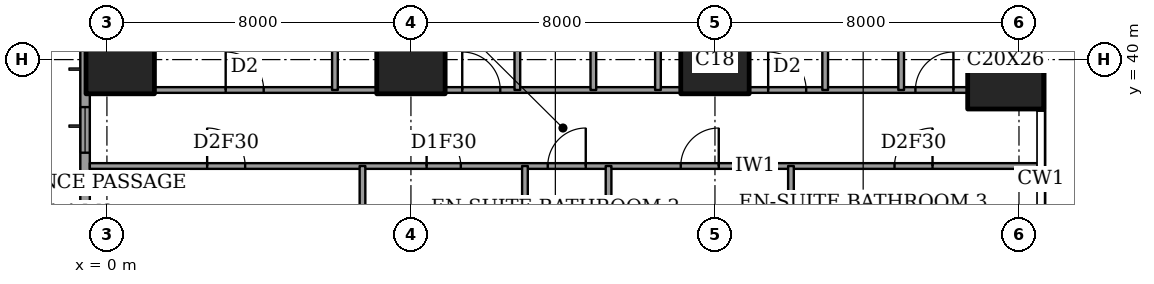
"""IFC4 building model, lengths in metres.
Left out: names, types, materials, properties, quantities, classifications, styles, units other than length and angle.
Written with IfcOpenShell. Run it as: python <this file> out.ifc"""

import sys

from ifc_helpers import new_model, si_unit, direction, frame, frame_2d, origin, origin_2d, place, context, subcontext, project, spatial, rectangle, extrude, element, fill, save


model = new_model("IFC4")
c1 = context("Model", 3, precision=1e-05, world=origin(), true_north=direction((0.0, 1.0)))
c2 = subcontext(c1, "Body", "Model", "MODEL_VIEW")
j1 = project(units=[si_unit("LENGTHUNIT", "METRE"), si_unit("PLANEANGLEUNIT", "RADIAN")], contexts=[c1])
p1 = place(None, origin())
s1 = spatial("IfcSite", under=j1, at=p1, CompositionType="ELEMENT")
p2 = place(p1, origin())
s2 = spatial("IfcBuilding", under=s1, at=p2, CompositionType="ELEMENT")
p3 = place(p2, frame((0.0, 0.0, 203.8)))
s3 = spatial("IfcBuildingStorey", under=s2, at=p3, CompositionType="ELEMENT", Elevation=203.8)
for number, where, z_axis, x_axis in (
    (1, (0.35, 40.0, 0.0), (0.0, 0.0, 1.0), (1.0, 0.0, 0.0)),
    (2, (8.0, 40.0, 0.0), (0.0, 0.0, 1.0), (1.0, 0.0, 0.0)),
    (3, (16.0, 40.0, 0.0), (0.0, 0.0, 1.0), (1.0, 0.0, 0.0)),
):
    element("IfcColumn", number, at=place(p3, frame(where, z_axis=z_axis, x_axis=x_axis)), inside=s3, PredefinedType="COLUMN", context=c2, shape_type="SweptSolid", body=[
        extrude(rectangle(XDim=1.8, YDim=1.8, at=origin_2d()), origin(), (0.0, 0.0, 1.0), 3.6),
    ])
p4 = place(p3, frame((23.65, 40.0, 0.0), z_axis=(0.0, 0.0, 1.0), x_axis=(1.0, 0.0, 0.0)))
e4 = element("IfcColumn", 4, at=p4, inside=s3, PredefinedType="COLUMN", context=c2, shape_type="SweptSolid", body=[
    extrude(rectangle(XDim=2.0, YDim=2.6, at=origin_2d()), origin(), (0.0, 0.0, 1.0), 3.6),
])
p5 = place(p3, frame((-0.575, 44.825, 0.0), z_axis=(0.0, 0.0, 1.0), x_axis=(0.0, -1.0, 0.0)))
e5 = element("IfcWall", 5, at=p5, inside=s3, PredefinedType="SOLIDWALL", context=c2, shape_type="SweptSolid", body=[
    extrude(rectangle(XDim=41.65, YDim=0.25, at=frame_2d((20.825, 0.0))), origin(), (0.0, 0.0, 1.0), 3.6),
])
p6 = place(p5, frame((0.825, 0.0, 0.2)))
e6 = element("IfcOpeningElement", 6, at=p6, cuts=e5, PredefinedType="OPENING", context=c2, shape_type="SweptSolid", body=[
    extrude(rectangle(XDim=2.4, YDim=2.4, at=frame_2d((1.2, 1.2))), frame((0.0, 0.135, 0.0), z_axis=(0.0, -1.0, 0.0), x_axis=(1.0, 0.0, 0.0)), (0.0, 0.0, 1.0), 0.27),
])
p7 = place(p5, frame((6.075, 0.0, 0.2)))
e7 = element("IfcOpeningElement", 7, at=p7, cuts=e5, PredefinedType="OPENING", context=c2, shape_type="SweptSolid", body=[
    extrude(rectangle(XDim=1.2, YDim=2.4, at=frame_2d((0.6, 1.2))), frame((0.0, 0.135, 0.0), z_axis=(0.0, -1.0, 0.0), x_axis=(1.0, 0.0, 0.0)), (0.0, 0.0, 1.0), 0.27),
])
p8 = place(p5, frame((8.575, 0.0, 0.2)))
e8 = element("IfcOpeningElement", 8, at=p8, cuts=e5, PredefinedType="OPENING", context=c2, shape_type="SweptSolid", body=[
    extrude(rectangle(XDim=2.4, YDim=2.4, at=frame_2d((1.2, 1.2))), frame((0.0, 0.135, 0.0), z_axis=(0.0, -1.0, 0.0), x_axis=(1.0, 0.0, 0.0)), (0.0, 0.0, 1.0), 0.27),
])
p9 = place(p5, frame((15.675, 0.0, 0.2)))
e9 = element("IfcOpeningElement", 9, at=p9, cuts=e5, PredefinedType="OPENING", context=c2, shape_type="SweptSolid", body=[
    extrude(rectangle(XDim=2.4, YDim=2.4, at=frame_2d((1.2, 1.2))), frame((0.0, 0.135, 0.0), z_axis=(0.0, -1.0, 0.0), x_axis=(1.0, 0.0, 0.0)), (0.0, 0.0, 1.0), 0.27),
])
p10 = place(p5, frame((23.575, 0.0, 0.2)))
e10 = element("IfcOpeningElement", 10, at=p10, cuts=e5, PredefinedType="OPENING", context=c2, shape_type="SweptSolid", body=[
    extrude(rectangle(XDim=2.4, YDim=2.4, at=frame_2d((1.2, 1.2))), frame((0.0, 0.135, 0.0), z_axis=(0.0, -1.0, 0.0), x_axis=(1.0, 0.0, 0.0)), (0.0, 0.0, 1.0), 0.27),
])
p11 = place(p5, frame((30.775, 0.0, 0.2)))
e11 = element("IfcOpeningElement", 11, at=p11, cuts=e5, PredefinedType="OPENING", context=c2, shape_type="SweptSolid", body=[
    extrude(rectangle(XDim=2.4, YDim=2.4, at=frame_2d((1.2, 1.2))), frame((0.0, 0.135, 0.0), z_axis=(0.0, -1.0, 0.0), x_axis=(1.0, 0.0, 0.0)), (0.0, 0.0, 1.0), 0.27),
])
p12 = place(p5, frame((34.55, 0.0, 0.2)))
e12 = element("IfcOpeningElement", 12, at=p12, cuts=e5, PredefinedType="OPENING", context=c2, shape_type="SweptSolid", body=[
    extrude(rectangle(XDim=1.2, YDim=2.4, at=frame_2d((0.6, 1.2))), frame((0.0, 0.135, 0.0), z_axis=(0.0, -1.0, 0.0), x_axis=(1.0, 0.0, 0.0)), (0.0, 0.0, 1.0), 0.27),
])
p13 = place(p5, frame((38.425, 0.0, 0.2)))
e13 = element("IfcOpeningElement", 13, at=p13, cuts=e5, PredefinedType="OPENING", context=c2, shape_type="SweptSolid", body=[
    extrude(rectangle(XDim=2.4, YDim=2.4, at=frame_2d((1.2, 1.2))), frame((0.0, 0.135, 0.0), z_axis=(0.0, -1.0, 0.0), x_axis=(1.0, 0.0, 0.0)), (0.0, 0.0, 1.0), 0.27),
])
p14 = place(p3, frame((-0.45, 37.2, 0.0), z_axis=(0.0, 0.0, 1.0), x_axis=(1.0, 0.0, 0.0)))
e14 = element("IfcWall", 14, at=p14, inside=s3, PredefinedType="PARTITIONING", context=c2, shape_type="SweptSolid", body=[
    extrude(rectangle(XDim=25.011, YDim=0.15, at=frame_2d((12.505, 0.0))), origin(), (0.0, 0.0, 1.0), 3.35),
])
p15 = place(p14, frame((12.05, 0.0, 0.0)))
e15 = element("IfcOpeningElement", 15, at=p15, cuts=e14, PredefinedType="OPENING", context=c2, shape_type="SweptSolid", body=[
    extrude(rectangle(XDim=1.0, YDim=2.1, at=frame_2d((0.5, 1.05))), frame((0.0, 0.085, 0.0), z_axis=(0.0, -1.0, 0.0), x_axis=(1.0, 0.0, 0.0)), (0.0, 0.0, 1.0), 0.17),
])
p16 = place(p14, frame((3.087, 0.0, 0.0)))
e16 = element("IfcOpeningElement", 16, at=p16, cuts=e14, PredefinedType="OPENING", context=c2, shape_type="SweptSolid", body=[
    extrude(rectangle(XDim=1.0, YDim=2.1, at=frame_2d((0.5, 1.05))), frame((0.0, 0.085, 0.0), z_axis=(0.0, -1.0, 0.0), x_axis=(1.0, 0.0, 0.0)), (0.0, 0.0, 1.0), 0.17),
])
p17 = place(p14, frame((8.863, 0.0, 0.0)))
e17 = element("IfcOpeningElement", 17, at=p17, cuts=e14, PredefinedType="OPENING", context=c2, shape_type="SweptSolid", body=[
    extrude(rectangle(XDim=0.9, YDim=2.1, at=frame_2d((0.45, 1.05))), frame((0.0, 0.085, 0.0), z_axis=(0.0, -1.0, 0.0), x_axis=(1.0, 0.0, 0.0)), (0.0, 0.0, 1.0), 0.17),
])
p18 = place(p14, frame((15.55, 0.0, 0.0)))
e18 = element("IfcOpeningElement", 18, at=p18, cuts=e14, PredefinedType="OPENING", context=c2, shape_type="SweptSolid", body=[
    extrude(rectangle(XDim=1.0, YDim=2.1, at=frame_2d((0.5, 1.05))), frame((0.0, 0.085, 0.0), z_axis=(0.0, -1.0, 0.0), x_axis=(1.0, 0.0, 0.0)), (0.0, 0.0, 1.0), 0.17),
])
p19 = place(p14, frame((21.175, 0.0, 0.0)))
e19 = element("IfcOpeningElement", 19, at=p19, cuts=e14, PredefinedType="OPENING", context=c2, shape_type="SweptSolid", body=[
    extrude(rectangle(XDim=1.0, YDim=2.1, at=frame_2d((0.5, 1.05))), frame((0.0, 0.085, 0.0), z_axis=(0.0, -1.0, 0.0), x_axis=(1.0, 0.0, 0.0)), (0.0, 0.0, 1.0), 0.17),
])
p20 = place(p3, frame((1.25, 39.2, 0.0), z_axis=(0.0, 0.0, 1.0), x_axis=(1.0, 0.0, 0.0)))
e20 = element("IfcWall", 20, at=p20, inside=s3, PredefinedType="PARTITIONING", context=c2, shape_type="SweptSolid", body=[
    extrude(rectangle(XDim=5.85, YDim=0.15, at=frame_2d((2.925, 0.0))), origin(), (0.0, 0.0, 1.0), 3.35),
])
p21 = place(p20, frame((1.875, 0.0, 0.0)))
e21 = element("IfcOpeningElement", 21, at=p21, cuts=e20, PredefinedType="OPENING", context=c2, shape_type="SweptSolid", body=[
    extrude(rectangle(XDim=1.0, YDim=2.1, at=frame_2d((0.5, 1.05))), frame((0.0, 0.085, 0.0), z_axis=(0.0, -1.0, 0.0), x_axis=(1.0, 0.0, 0.0)), (0.0, 0.0, 1.0), 0.17),
])
p22 = place(p3, frame((8.9, 39.2, 0.0), z_axis=(0.0, 0.0, 1.0), x_axis=(1.0, 0.0, 0.0)))
e22 = element("IfcWall", 22, at=p22, inside=s3, PredefinedType="PARTITIONING", context=c2, shape_type="SweptSolid", body=[
    extrude(rectangle(XDim=6.2, YDim=0.15, at=frame_2d((3.1, 0.0))), origin(), (0.0, 0.0, 1.0), 3.35),
])
p23 = place(p22, frame((0.45, 0.0, 0.0)))
e23 = element("IfcOpeningElement", 23, at=p23, cuts=e22, PredefinedType="OPENING", context=c2, shape_type="SweptSolid", body=[
    extrude(rectangle(XDim=1.0, YDim=2.1, at=frame_2d((0.5, 1.05))), frame((0.0, 0.085, 0.0), z_axis=(0.0, -1.0, 0.0), x_axis=(1.0, 0.0, 0.0)), (0.0, 0.0, 1.0), 0.17),
])
p24 = place(p3, frame((16.9, 39.2, 0.0), z_axis=(0.0, 0.0, 1.0), x_axis=(1.0, 0.0, 0.0)))
e24 = element("IfcWall", 24, at=p24, inside=s3, PredefinedType="PARTITIONING", context=c2, shape_type="SweptSolid", body=[
    extrude(rectangle(XDim=5.75, YDim=0.15, at=frame_2d((2.875, 0.0))), origin(), (0.0, 0.0, 1.0), 3.35),
])
p25 = place(p24, frame((0.5, 0.0, 0.0)))
e25 = element("IfcOpeningElement", 25, at=p25, cuts=e24, PredefinedType="OPENING", context=c2, shape_type="SweptSolid", body=[
    extrude(rectangle(XDim=1.0, YDim=2.1, at=frame_2d((0.5, 1.05))), frame((0.0, 0.085, 0.0), z_axis=(0.0, -1.0, 0.0), x_axis=(1.0, 0.0, 0.0)), (0.0, 0.0, 1.0), 0.17),
])
p26 = place(p24, frame((4.375, 0.0, 0.0)))
e26 = element("IfcOpeningElement", 26, at=p26, cuts=e24, PredefinedType="OPENING", context=c2, shape_type="SweptSolid", body=[
    extrude(rectangle(XDim=1.0, YDim=2.1, at=frame_2d((0.5, 1.05))), frame((0.0, 0.085, 0.0), z_axis=(0.0, -1.0, 0.0), x_axis=(1.0, 0.0, 0.0)), (0.0, 0.0, 1.0), 0.17),
])
p27 = place(p3, frame((6.0, 39.2, 0.0), z_axis=(0.0, 0.0, 1.0), x_axis=(0.0, 1.0, 0.0)))
e27 = element("IfcWall", 27, at=p27, inside=s3, PredefinedType="PARTITIONING", context=c2, shape_type="SweptSolid", body=[
    extrude(rectangle(XDim=9.25, YDim=0.15, at=frame_2d((4.625, 0.0))), origin(), (0.0, 0.0, 1.0), 3.35),
])
p28 = place(p3, frame((6.725, 33.2, 0.0), z_axis=(0.0, 0.0, 1.0), x_axis=(0.0, 1.0, 0.0)))
e28 = element("IfcWall", 28, at=p28, inside=s3, PredefinedType="PARTITIONING", context=c2, shape_type="SweptSolid", body=[
    extrude(rectangle(XDim=4.0, YDim=0.15, at=frame_2d((2.0, 0.0))), origin(), (0.0, 0.0, 1.0), 3.35),
])
p29 = place(p3, frame((10.8, 39.2, 0.0), z_axis=(0.0, 0.0, 1.0), x_axis=(0.0, 1.0, 0.0)))
e29 = element("IfcWall", 29, at=p29, inside=s3, PredefinedType="PARTITIONING", context=c2, shape_type="SweptSolid", body=[
    extrude(rectangle(XDim=3.4, YDim=0.15, at=frame_2d((1.7, 0.0))), origin(), (0.0, 0.0, 1.0), 3.35),
])
p30 = place(p29, frame((1.25, 0.0, 0.0)))
e30 = element("IfcOpeningElement", 30, at=p30, cuts=e29, PredefinedType="OPENING", context=c2, shape_type="SweptSolid", body=[
    extrude(rectangle(XDim=0.9, YDim=2.1, at=frame_2d((0.45, 1.05))), frame((0.0, 0.085, 0.0), z_axis=(0.0, -1.0, 0.0), x_axis=(1.0, 0.0, 0.0)), (0.0, 0.0, 1.0), 0.17),
])
p31 = place(p3, frame((11.0, 28.0, 0.0), z_axis=(0.0, 0.0, 1.0), x_axis=(0.0, 1.0, 0.0)))
e31 = element("IfcWall", 31, at=p31, inside=s3, PredefinedType="PARTITIONING", context=c2, shape_type="SweptSolid", body=[
    extrude(rectangle(XDim=9.2, YDim=0.15, at=frame_2d((4.6, 0.0))), origin(), (0.0, 0.0, 1.0), 3.35),
])
p32 = place(p31, frame((0.837, 0.0, 0.0)))
e32 = element("IfcOpeningElement", 32, at=p32, cuts=e31, PredefinedType="OPENING", context=c2, shape_type="SweptSolid", body=[
    extrude(rectangle(XDim=1.0, YDim=2.1, at=frame_2d((0.5, 1.05))), frame((0.0, 0.085, 0.0), z_axis=(0.0, -1.0, 0.0), x_axis=(1.0, 0.0, 0.0)), (0.0, 0.0, 1.0), 0.17),
])
p33 = place(p3, frame((12.8, 39.2, 0.0), z_axis=(0.0, 0.0, 1.0), x_axis=(0.0, 1.0, 0.0)))
e33 = element("IfcWall", 33, at=p33, inside=s3, PredefinedType="PARTITIONING", context=c2, shape_type="SweptSolid", body=[
    extrude(rectangle(XDim=9.25, YDim=0.15, at=frame_2d((4.625, 0.0))), origin(), (0.0, 0.0, 1.0), 3.35),
])
p34 = place(p33, frame((5.875, 0.0, 0.0)))
e34 = element("IfcOpeningElement", 34, at=p34, cuts=e33, PredefinedType="OPENING", context=c2, shape_type="SweptSolid", body=[
    extrude(rectangle(XDim=0.9, YDim=2.1, at=frame_2d((0.45, 1.05))), frame((0.0, 0.085, 0.0), z_axis=(0.0, -1.0, 0.0), x_axis=(1.0, 0.0, 0.0)), (0.0, 0.0, 1.0), 0.17),
])
p35 = place(p3, frame((13.2, 30.675, 0.0), z_axis=(0.0, 0.0, 1.0), x_axis=(0.0, 1.0, 0.0)))
e35 = element("IfcWall", 35, at=p35, inside=s3, PredefinedType="PARTITIONING", context=c2, shape_type="SweptSolid", body=[
    extrude(rectangle(XDim=6.525, YDim=0.15, at=frame_2d((3.262, 0.0))), origin(), (0.0, 0.0, 1.0), 3.35),
])
p36 = place(p3, frame((14.5, 39.2, 0.0), z_axis=(0.0, 0.0, 1.0), x_axis=(0.0, 1.0, 0.0)))
e36 = element("IfcWall", 36, at=p36, inside=s3, PredefinedType="PARTITIONING", context=c2, shape_type="SweptSolid", body=[
    extrude(rectangle(XDim=9.25, YDim=0.15, at=frame_2d((4.625, 0.0))), origin(), (0.0, 0.0, 1.0), 3.35),
])
p37 = place(p3, frame((18.0, 28.0, 0.0), z_axis=(0.0, 0.0, 1.0), x_axis=(0.0, 1.0, 0.0)))
e37 = element("IfcWall", 37, at=p37, inside=s3, PredefinedType="PARTITIONING", context=c2, shape_type="SweptSolid", body=[
    extrude(rectangle(XDim=9.2, YDim=0.15, at=frame_2d((4.6, 0.0))), origin(), (0.0, 0.0, 1.0), 3.35),
])
p38 = place(p37, frame((0.837, 0.0, 0.0)))
e38 = element("IfcOpeningElement", 38, at=p38, cuts=e37, PredefinedType="OPENING", context=c2, shape_type="SweptSolid", body=[
    extrude(rectangle(XDim=1.0, YDim=2.1, at=frame_2d((0.5, 1.05))), frame((0.0, 0.085, 0.0), z_axis=(0.0, -1.0, 0.0), x_axis=(1.0, 0.0, 0.0)), (0.0, 0.0, 1.0), 0.17),
])
p39 = place(p3, frame((18.9, 39.2, 0.0), z_axis=(0.0, 0.0, 1.0), x_axis=(0.0, 1.0, 0.0)))
e39 = element("IfcWall", 39, at=p39, inside=s3, PredefinedType="PARTITIONING", context=c2, shape_type="SweptSolid", body=[
    extrude(rectangle(XDim=3.7, YDim=0.15, at=frame_2d((1.85, 0.0))), origin(), (0.0, 0.0, 1.0), 3.35),
])
p40 = place(p39, frame((1.4, 0.0, 0.0)))
e40 = element("IfcOpeningElement", 40, at=p40, cuts=e39, PredefinedType="OPENING", context=c2, shape_type="SweptSolid", body=[
    extrude(rectangle(XDim=0.9, YDim=2.1, at=frame_2d((0.45, 1.05))), frame((0.0, 0.085, 0.0), z_axis=(0.0, -1.0, 0.0), x_axis=(1.0, 0.0, 0.0)), (0.0, 0.0, 1.0), 0.17),
])
p41 = place(p3, frame((20.9, 39.2, 0.0), z_axis=(0.0, 0.0, 1.0), x_axis=(0.0, 1.0, 0.0)))
e41 = element("IfcWall", 41, at=p41, inside=s3, PredefinedType="PARTITIONING", context=c2, shape_type="SweptSolid", body=[
    extrude(rectangle(XDim=9.25, YDim=0.15, at=frame_2d((4.625, 0.0))), origin(), (0.0, 0.0, 1.0), 3.35),
])
p42 = place(p7, origin())
e42 = element("IfcWindow", 42, at=p42, inside=s3, PartitioningType="SINGLE_PANEL", PredefinedType="WINDOW", context=c2, shape_type="SweptSolid", body=[
    extrude(rectangle(XDim=1.2, YDim=2.4, at=frame_2d((0.6, 1.2))), frame((0.0, 0.03, 0.0), z_axis=(0.0, -1.0, 0.0), x_axis=(1.0, 0.0, 0.0)), (0.0, 0.0, 1.0), 0.06),
])
fill(e7, e42)
p43 = place(p8, origin())
e43 = element("IfcWindow", 43, at=p43, inside=s3, PartitioningType="SINGLE_PANEL", PredefinedType="WINDOW", context=c2, shape_type="SweptSolid", body=[
    extrude(rectangle(XDim=2.4, YDim=2.4, at=frame_2d((1.2, 1.2))), frame((0.0, 0.03, 0.0), z_axis=(0.0, -1.0, 0.0), x_axis=(1.0, 0.0, 0.0)), (0.0, 0.0, 1.0), 0.06),
])
fill(e8, e43)
p44 = place(p21, origin())
e44 = element("IfcDoor", 44, at=p44, inside=s3, OperationType="SINGLE_SWING_RIGHT", PredefinedType="DOOR", context=c2, shape_type="SweptSolid", body=[
    extrude(rectangle(XDim=1.0, YDim=2.1, at=frame_2d((0.5, 1.05))), frame((0.0, 0.025, 0.0), z_axis=(0.0, -1.0, 0.0), x_axis=(1.0, 0.0, 0.0)), (0.0, 0.0, 1.0), 0.05),
])
fill(e21, e44)
p45 = place(p23, origin())
e45 = element("IfcDoor", 45, at=p45, inside=s3, OperationType="SINGLE_SWING_RIGHT", PredefinedType="DOOR", context=c2, shape_type="SweptSolid", body=[
    extrude(rectangle(XDim=1.0, YDim=2.1, at=frame_2d((0.5, 1.05))), frame((0.0, 0.025, 0.0), z_axis=(0.0, -1.0, 0.0), x_axis=(1.0, 0.0, 0.0)), (0.0, 0.0, 1.0), 0.05),
])
fill(e23, e45)
p46 = place(p25, origin())
e46 = element("IfcDoor", 46, at=p46, inside=s3, OperationType="SINGLE_SWING_RIGHT", PredefinedType="DOOR", context=c2, shape_type="SweptSolid", body=[
    extrude(rectangle(XDim=1.0, YDim=2.1, at=frame_2d((0.5, 1.05))), frame((0.0, 0.025, 0.0), z_axis=(0.0, -1.0, 0.0), x_axis=(1.0, 0.0, 0.0)), (0.0, 0.0, 1.0), 0.05),
])
fill(e25, e46)
p47 = place(p26, origin())
e47 = element("IfcDoor", 47, at=p47, inside=s3, OperationType="SINGLE_SWING_LEFT", PredefinedType="DOOR", context=c2, shape_type="SweptSolid", body=[
    extrude(rectangle(XDim=1.0, YDim=2.1, at=frame_2d((0.5, 1.05))), frame((0.0, 0.025, 0.0), z_axis=(0.0, -1.0, 0.0), x_axis=(1.0, 0.0, 0.0)), (0.0, 0.0, 1.0), 0.05),
])
fill(e26, e47)
p48 = place(p15, origin())
e48 = element("IfcDoor", 48, at=p48, inside=s3, OperationType="SINGLE_SWING_LEFT", PredefinedType="DOOR", context=c2, shape_type="SweptSolid", body=[
    extrude(rectangle(XDim=1.0, YDim=2.1, at=frame_2d((0.5, 1.05))), frame((0.0, 0.025, 0.0), z_axis=(0.0, -1.0, 0.0), x_axis=(1.0, 0.0, 0.0)), (0.0, 0.0, 1.0), 0.05),
])
fill(e15, e48)
p49 = place(p16, origin())
e49 = element("IfcDoor", 49, at=p49, inside=s3, OperationType="SINGLE_SWING_RIGHT", PredefinedType="DOOR", context=c2, shape_type="SweptSolid", body=[
    extrude(rectangle(XDim=1.0, YDim=2.1, at=frame_2d((0.5, 1.05))), frame((0.0, 0.025, 0.0), z_axis=(0.0, -1.0, 0.0), x_axis=(1.0, 0.0, 0.0)), (0.0, 0.0, 1.0), 0.05),
])
fill(e16, e49)
p50 = place(p17, origin())
e50 = element("IfcDoor", 50, at=p50, inside=s3, OperationType="SINGLE_SWING_RIGHT", PredefinedType="DOOR", context=c2, shape_type="SweptSolid", body=[
    extrude(rectangle(XDim=0.9, YDim=2.1, at=frame_2d((0.45, 1.05))), frame((0.0, 0.025, 0.0), z_axis=(0.0, -1.0, 0.0), x_axis=(1.0, 0.0, 0.0)), (0.0, 0.0, 1.0), 0.05),
])
fill(e17, e50)
p51 = place(p18, origin())
e51 = element("IfcDoor", 51, at=p51, inside=s3, OperationType="SINGLE_SWING_LEFT", PredefinedType="DOOR", context=c2, shape_type="SweptSolid", body=[
    extrude(rectangle(XDim=1.0, YDim=2.1, at=frame_2d((0.5, 1.05))), frame((0.0, 0.025, 0.0), z_axis=(0.0, -1.0, 0.0), x_axis=(1.0, 0.0, 0.0)), (0.0, 0.0, 1.0), 0.05),
])
fill(e18, e51)
p52 = place(p19, origin())
e52 = element("IfcDoor", 52, at=p52, inside=s3, OperationType="SINGLE_SWING_LEFT", PredefinedType="DOOR", context=c2, shape_type="SweptSolid", body=[
    extrude(rectangle(XDim=1.0, YDim=2.1, at=frame_2d((0.5, 1.05))), frame((0.0, 0.025, 0.0), z_axis=(0.0, -1.0, 0.0), x_axis=(1.0, 0.0, 0.0)), (0.0, 0.0, 1.0), 0.05),
])
fill(e19, e52)
save(model, sys.argv[1])
